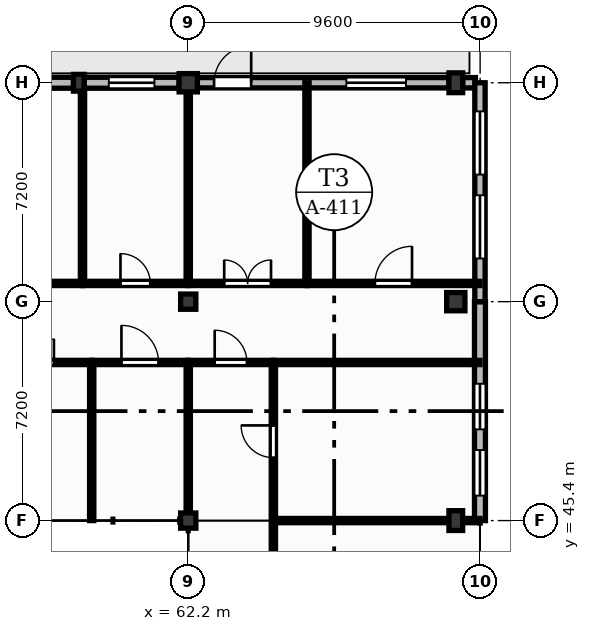
"""IFC4 building model, lengths in metres.
Left out: names, types, materials, properties, quantities, classifications, styles, units other than length and angle.
Written with IfcOpenShell. Run it as: python <this file> out.ifc"""

import sys

from ifc_helpers import new_model, si_unit, direction, frame, frame_2d, origin, origin_2d, place, context, subcontext, project, spatial, rectangle, extrude, element, fill, save


model = new_model("IFC4")
c1 = context("Model", 3, precision=1e-05, world=origin(), true_north=direction((0.0, 1.0)))
c2 = subcontext(c1, "Body", "Model", "MODEL_VIEW")
j1 = project(units=[si_unit("LENGTHUNIT", "METRE"), si_unit("PLANEANGLEUNIT", "RADIAN")], contexts=[c1])
p1 = place(None, origin())
s1 = spatial("IfcSite", under=j1, at=p1, CompositionType="ELEMENT")
p2 = place(p1, origin())
s2 = spatial("IfcBuilding", under=s1, at=p2, CompositionType="ELEMENT")
p3 = place(p2, origin())
s3 = spatial("IfcBuildingStorey", under=s2, at=p3, CompositionType="ELEMENT", Elevation=0.0)
for number, where, z_axis, x_axis in (
    (1, (62.2, 45.4, 0.0), (0.0, 0.0, 1.0), (1.0, 0.0, 0.0)),
    (2, (62.2, 52.6, 0.0), (0.0, 0.0, 1.0), (1.0, 0.0, 0.0)),
):
    element("IfcColumn", number, at=place(p3, frame(where, z_axis=z_axis, x_axis=x_axis)), inside=s3, PredefinedType="COLUMN", context=c2, shape_type="SweptSolid", body=[
        extrude(rectangle(XDim=0.5, YDim=0.5, at=origin_2d()), origin(), (0.0, 0.0, 1.0), 4.2),
    ])
p4 = place(p3, frame((62.2, 59.8, 0.0), z_axis=(0.0, 0.0, 1.0), x_axis=(1.0, 0.0, 0.0)))
e3 = element("IfcColumn", 3, at=p4, inside=s3, PredefinedType="COLUMN", context=c2, shape_type="SweptSolid", body=[
    extrude(rectangle(XDim=0.6, YDim=0.6, at=origin_2d()), origin(), (0.0, 0.0, 1.0), 4.2),
])
p5 = place(p3, frame((71.0, 45.4, 0.0), z_axis=(0.0, 0.0, 1.0), x_axis=(1.0, 0.0, 0.0)))
e4 = element("IfcColumn", 4, at=p5, inside=s3, PredefinedType="COLUMN", context=c2, shape_type="SweptSolid", body=[
    extrude(rectangle(XDim=0.45, YDim=0.65, at=origin_2d()), origin(), (0.0, 0.0, 1.0), 4.2),
])
p6 = place(p3, frame((71.0, 52.6, 0.0), z_axis=(0.0, 0.0, 1.0), x_axis=(1.0, 0.0, 0.0)))
e5 = element("IfcColumn", 5, at=p6, inside=s3, PredefinedType="COLUMN", context=c2, shape_type="SweptSolid", body=[
    extrude(rectangle(XDim=0.6, YDim=0.6, at=origin_2d()), origin(), (0.0, 0.0, 1.0), 4.2),
])
p7 = place(p3, frame((71.0, 59.8, 0.0), z_axis=(0.0, 0.0, 1.0), x_axis=(1.0, 0.0, 0.0)))
e6 = element("IfcColumn", 6, at=p7, inside=s3, PredefinedType="COLUMN", context=c2, shape_type="SweptSolid", body=[
    extrude(rectangle(XDim=0.45, YDim=0.65, at=origin_2d()), origin(), (0.0, 0.0, 1.0), 4.2),
])
p8 = place(p3, frame((58.6, 59.8, 0.0), z_axis=(0.0, 0.0, 1.0), x_axis=(1.0, 0.0, 0.0)))
e7 = element("IfcColumn", 7, at=p8, inside=s3, PredefinedType="PILASTER", context=c2, shape_type="SweptSolid", body=[
    extrude(rectangle(XDim=0.35, YDim=0.55, at=origin_2d()), origin(), (0.0, 0.0, 1.0), 4.2),
])
p9 = place(p3, frame((55.225, 59.8, 0.0), z_axis=(0.0, 0.0, 1.0), x_axis=(1.0, 0.0, 0.0)))
e8 = element("IfcWall", 8, at=p9, inside=s3, PredefinedType="SOLIDWALL", context=c2, shape_type="SweptSolid", body=[
    extrude(rectangle(XDim=3.2, YDim=0.36, at=frame_2d((1.6, 0.0))), origin(), (0.0, 0.0, 1.0), 3.68),
])
p10 = place(p9, frame((1.025, 0.0, 1.5)))
e9 = element("IfcOpeningElement", 9, at=p10, cuts=e8, PredefinedType="OPENING", context=c2, shape_type="SweptSolid", body=[
    extrude(rectangle(XDim=1.15, YDim=1.25, at=frame_2d((0.575, 0.625))), frame((0.0, 0.19, 0.0), z_axis=(0.0, -1.0, 0.0), x_axis=(1.0, 0.0, 0.0)), (0.0, 0.0, 1.0), 0.38),
])
p11 = place(p3, frame((58.775, 59.8, 0.0), z_axis=(0.0, 0.0, 1.0), x_axis=(1.0, 0.0, 0.0)))
e10 = element("IfcWall", 10, at=p11, inside=s3, PredefinedType="SOLIDWALL", context=c2, shape_type="SweptSolid", body=[
    extrude(rectangle(XDim=3.125, YDim=0.36, at=frame_2d((1.562, 0.0))), origin(), (0.0, 0.0, 1.0), 3.68),
])
p12 = place(p11, frame((0.812, 0.0, 1.5)))
e11 = element("IfcOpeningElement", 11, at=p12, cuts=e10, PredefinedType="OPENING", context=c2, shape_type="SweptSolid", body=[
    extrude(rectangle(XDim=1.5, YDim=1.25, at=frame_2d((0.75, 0.625))), frame((0.0, 0.19, 0.0), z_axis=(0.0, -1.0, 0.0), x_axis=(1.0, 0.0, 0.0)), (0.0, 0.0, 1.0), 0.38),
])
p13 = place(p3, frame((71.795, 45.4, 0.0), z_axis=(0.0, 0.0, 1.0), x_axis=(0.0, 1.0, 0.0)))
e12 = element("IfcWall", 12, at=p13, inside=s3, PredefinedType="SOLIDWALL", context=c2, shape_type="SweptSolid", body=[
    extrude(rectangle(XDim=7.2, YDim=0.36, at=frame_2d((3.6, 0.0))), origin(), (0.0, 0.0, 1.0), 4.2),
])
p14 = place(p13, frame((0.82, 0.0, 1.5)))
e13 = element("IfcOpeningElement", 13, at=p14, cuts=e12, PredefinedType="OPENING", context=c2, shape_type="SweptSolid", body=[
    extrude(rectangle(XDim=1.5, YDim=1.25, at=frame_2d((0.75, 0.625))), frame((0.0, 0.19, 0.0), z_axis=(0.0, -1.0, 0.0), x_axis=(1.0, 0.0, 0.0)), (0.0, 0.0, 1.0), 0.38),
])
p15 = place(p13, frame((3.0, 0.0, 1.5)))
e14 = element("IfcOpeningElement", 14, at=p15, cuts=e12, PredefinedType="OPENING", context=c2, shape_type="SweptSolid", body=[
    extrude(rectangle(XDim=1.5, YDim=1.25, at=frame_2d((0.75, 0.625))), frame((0.0, 0.19, 0.0), z_axis=(0.0, -1.0, 0.0), x_axis=(1.0, 0.0, 0.0)), (0.0, 0.0, 1.0), 0.38),
])
p16 = place(p3, frame((62.5, 59.8, 0.0), z_axis=(0.0, 0.0, 1.0), x_axis=(1.0, 0.0, 0.0)))
e15 = element("IfcWall", 15, at=p16, inside=s3, PredefinedType="SOLIDWALL", context=c2, shape_type="SweptSolid", body=[
    extrude(rectangle(XDim=8.275, YDim=0.34, at=frame_2d((4.137, 0.0))), origin(), (0.0, 0.0, 1.0), 3.68),
])
p17 = place(p16, frame((0.55, 0.0, 0.0)))
e16 = element("IfcOpeningElement", 16, at=p17, cuts=e15, PredefinedType="OPENING", context=c2, shape_type="SweptSolid", body=[
    extrude(rectangle(XDim=1.22, YDim=2.2, at=frame_2d((0.61, 1.1))), frame((0.0, 0.18, 0.0), z_axis=(0.0, -1.0, 0.0), x_axis=(1.0, 0.0, 0.0)), (0.0, 0.0, 1.0), 0.36),
])
p18 = place(p16, frame((4.9, 0.0, 1.05)))
e17 = element("IfcOpeningElement", 17, at=p18, cuts=e15, PredefinedType="OPENING", context=c2, shape_type="SweptSolid", body=[
    extrude(rectangle(XDim=1.96, YDim=1.65, at=frame_2d((0.98, 0.825))), frame((0.0, 0.18, 0.0), z_axis=(0.0, -1.0, 0.0), x_axis=(1.0, 0.0, 0.0)), (0.0, 0.0, 1.0), 0.36),
])
p19 = place(p3, frame((71.225, 59.8, 0.0), z_axis=(0.0, 0.0, 1.0), x_axis=(1.0, 0.0, 0.0)))
e18 = element("IfcWall", 18, at=p19, inside=s3, PredefinedType="SOLIDWALL", context=c2, shape_type="SweptSolid", body=[
    extrude(rectangle(XDim=0.42, YDim=0.34, at=frame_2d((0.21, 0.0))), origin(), (0.0, 0.0, 1.0), 4.2),
])
p20 = place(p3, frame((71.795, 52.6, 0.0), z_axis=(0.0, 0.0, 1.0), x_axis=(0.0, 1.0, 0.0)))
e19 = element("IfcWall", 19, at=p20, inside=s3, PredefinedType="SOLIDWALL", context=c2, shape_type="SweptSolid", body=[
    extrude(rectangle(XDim=7.2, YDim=0.34, at=frame_2d((3.6, 0.0))), origin(), (0.0, 0.0, 1.0), 4.2),
])
p21 = place(p20, frame((1.42, 0.0, 1.0)))
e20 = element("IfcOpeningElement", 20, at=p21, cuts=e19, PredefinedType="OPENING", context=c2, shape_type="SweptSolid", body=[
    extrude(rectangle(XDim=2.08, YDim=1.8, at=frame_2d((1.04, 0.9))), frame((0.0, 0.18, 0.0), z_axis=(0.0, -1.0, 0.0), x_axis=(1.0, 0.0, 0.0)), (0.0, 0.0, 1.0), 0.36),
])
p22 = place(p20, frame((4.18, 0.0, 1.0)))
e21 = element("IfcOpeningElement", 21, at=p22, cuts=e19, PredefinedType="OPENING", context=c2, shape_type="SweptSolid", body=[
    extrude(rectangle(XDim=2.08, YDim=1.8, at=frame_2d((1.04, 0.9))), frame((0.0, 0.18, 0.0), z_axis=(0.0, -1.0, 0.0), x_axis=(1.0, 0.0, 0.0)), (0.0, 0.0, 1.0), 0.36),
])
p23 = place(p3, frame((55.0, 50.6, 0.0), z_axis=(0.0, 0.0, 1.0), x_axis=(1.0, 0.0, 0.0)))
e22 = element("IfcWall", 22, at=p23, inside=s3, PredefinedType="PARTITIONING", context=c2, shape_type="SweptSolid", body=[
    extrude(rectangle(XDim=4.025, YDim=0.14, at=frame_2d((2.012, 0.0))), origin(), (0.0, 0.0, 1.0), 4.18),
])
p24 = place(p23, frame((1.242, 0.0, 0.0)))
e23 = element("IfcOpeningElement", 23, at=p24, cuts=e22, PredefinedType="OPENING", context=c2, shape_type="SweptSolid", body=[
    extrude(rectangle(XDim=1.54, YDim=2.25, at=frame_2d((0.77, 1.125))), frame((0.0, 0.08, 0.0), z_axis=(0.0, -1.0, 0.0), x_axis=(1.0, 0.0, 0.0)), (0.0, 0.0, 1.0), 0.16),
])
p25 = place(p3, frame((55.0, 53.2, 0.0), z_axis=(0.0, 0.0, 1.0), x_axis=(1.0, 0.0, 0.0)))
e24 = element("IfcWall", 24, at=p25, inside=s3, PredefinedType="PARTITIONING", context=c2, shape_type="SweptSolid", body=[
    extrude(rectangle(XDim=3.722, YDim=0.14, at=frame_2d((1.861, 0.0))), origin(), (0.0, 0.0, 1.0), 4.18),
])
p26 = place(p25, frame((1.386, 0.0, 0.0)))
e25 = element("IfcOpeningElement", 25, at=p26, cuts=e24, PredefinedType="OPENING", context=c2, shape_type="SweptSolid", body=[
    extrude(rectangle(XDim=0.95, YDim=2.1, at=frame_2d((0.475, 1.05))), frame((0.0, 0.08, 0.0), z_axis=(0.0, -1.0, 0.0), x_axis=(1.0, 0.0, 0.0)), (0.0, 0.0, 1.0), 0.16),
])
p27 = place(p3, frame((58.722, 53.27, 0.0), z_axis=(0.0, 0.0, 1.0), x_axis=(0.0, 1.0, 0.0)))
e26 = element("IfcWall", 26, at=p27, inside=s3, PredefinedType="PARTITIONING", context=c2, shape_type="SweptSolid", body=[
    extrude(rectangle(XDim=6.255, YDim=0.14, at=frame_2d((3.127, 0.0))), origin(), (0.0, 0.0, 1.0), 4.18),
])
p28 = place(p3, frame((58.722, 53.2, 0.0), z_axis=(0.0, 0.0, 1.0), x_axis=(1.0, 0.0, 0.0)))
e27 = element("IfcWall", 27, at=p28, inside=s3, PredefinedType="PARTITIONING", context=c2, shape_type="SweptSolid", body=[
    extrude(rectangle(XDim=3.478, YDim=0.14, at=frame_2d((1.739, 0.0))), origin(), (0.0, 0.0, 1.0), 4.18),
])
p29 = place(p28, frame((1.249, 0.0, 0.0)))
e28 = element("IfcOpeningElement", 28, at=p29, cuts=e27, PredefinedType="OPENING", context=c2, shape_type="SweptSolid", body=[
    extrude(rectangle(XDim=0.98, YDim=2.15, at=frame_2d((0.49, 1.075))), frame((0.0, 0.08, 0.0), z_axis=(0.0, -1.0, 0.0), x_axis=(1.0, 0.0, 0.0)), (0.0, 0.0, 1.0), 0.16),
])
p30 = place(p3, frame((59.025, 45.4, 0.0), z_axis=(0.0, 0.0, 1.0), x_axis=(0.0, 1.0, 0.0)))
e29 = element("IfcWall", 29, at=p30, inside=s3, PredefinedType="PARTITIONING", context=c2, shape_type="SweptSolid", body=[
    extrude(rectangle(XDim=5.13, YDim=0.14, at=frame_2d((2.565, 0.0))), origin(), (0.0, 0.0, 1.0), 4.18),
])
p31 = place(p3, frame((59.025, 50.6, 0.0), z_axis=(0.0, 0.0, 1.0), x_axis=(1.0, 0.0, 0.0)))
e30 = element("IfcWall", 30, at=p31, inside=s3, PredefinedType="PARTITIONING", context=c2, shape_type="SweptSolid", body=[
    extrude(rectangle(XDim=3.175, YDim=0.14, at=frame_2d((1.587, 0.0))), origin(), (0.0, 0.0, 1.0), 4.18),
])
p32 = place(p31, frame((0.978, 0.0, 0.0)))
e31 = element("IfcOpeningElement", 31, at=p32, cuts=e30, PredefinedType="OPENING", context=c2, shape_type="SweptSolid", body=[
    extrude(rectangle(XDim=1.22, YDim=2.1, at=frame_2d((0.61, 1.05))), frame((0.0, 0.08, 0.0), z_axis=(0.0, -1.0, 0.0), x_axis=(1.0, 0.0, 0.0)), (0.0, 0.0, 1.0), 0.16),
])
p33 = place(p3, frame((62.2, 45.65, 0.0), z_axis=(0.0, 0.0, 1.0), x_axis=(0.0, 1.0, 0.0)))
e32 = element("IfcWall", 32, at=p33, inside=s3, PredefinedType="PARTITIONING", context=c2, shape_type="SweptSolid", body=[
    extrude(rectangle(XDim=4.88, YDim=0.14, at=frame_2d((2.44, 0.0))), origin(), (0.0, 0.0, 1.0), 3.5),
])
p34 = place(p3, frame((62.2, 50.6, 0.0), z_axis=(0.0, 0.0, 1.0), x_axis=(1.0, 0.0, 0.0)))
e33 = element("IfcWall", 33, at=p34, inside=s3, PredefinedType="PARTITIONING", context=c2, shape_type="SweptSolid", body=[
    extrude(rectangle(XDim=2.8, YDim=0.14, at=frame_2d((1.4, 0.0))), origin(), (0.0, 0.0, 1.0), 4.18),
])
p35 = place(p34, frame((0.87, 0.0, 0.0)))
e34 = element("IfcOpeningElement", 34, at=p35, cuts=e33, PredefinedType="OPENING", context=c2, shape_type="SweptSolid", body=[
    extrude(rectangle(XDim=1.06, YDim=2.15, at=frame_2d((0.53, 1.075))), frame((0.0, 0.08, 0.0), z_axis=(0.0, -1.0, 0.0), x_axis=(1.0, 0.0, 0.0)), (0.0, 0.0, 1.0), 0.16),
])
p36 = place(p3, frame((62.2, 53.27, 0.0), z_axis=(0.0, 0.0, 1.0), x_axis=(0.0, 1.0, 0.0)))
e35 = element("IfcWall", 35, at=p36, inside=s3, PredefinedType="PARTITIONING", context=c2, shape_type="SweptSolid", body=[
    extrude(rectangle(XDim=6.23, YDim=0.14, at=frame_2d((3.115, 0.0))), origin(), (0.0, 0.0, 1.0), 3.5),
])
p37 = place(p3, frame((62.2, 53.2, 0.0), z_axis=(0.0, 0.0, 1.0), x_axis=(1.0, 0.0, 0.0)))
e36 = element("IfcWall", 36, at=p37, inside=s3, PredefinedType="PARTITIONING", context=c2, shape_type="SweptSolid", body=[
    extrude(rectangle(XDim=3.905, YDim=0.14, at=frame_2d((1.953, 0.0))), origin(), (0.0, 0.0, 1.0), 4.18),
])
p38 = place(p37, frame((1.183, 0.0, 0.0)))
e37 = element("IfcOpeningElement", 37, at=p38, cuts=e36, PredefinedType="OPENING", context=c2, shape_type="SweptSolid", body=[
    extrude(rectangle(XDim=1.54, YDim=2.25, at=frame_2d((0.77, 1.125))), frame((0.0, 0.08, 0.0), z_axis=(0.0, -1.0, 0.0), x_axis=(1.0, 0.0, 0.0)), (0.0, 0.0, 1.0), 0.16),
])
p39 = place(p3, frame((65.0, 36.87, 0.0), z_axis=(0.0, 0.0, 1.0), x_axis=(0.0, 1.0, 0.0)))
e38 = element("IfcWall", 38, at=p39, inside=s3, PredefinedType="PARTITIONING", context=c2, shape_type="SweptSolid", body=[
    extrude(rectangle(XDim=8.46, YDim=0.14, at=frame_2d((4.23, 0.0))), origin(), (0.0, 0.0, 1.0), 4.18),
])
p40 = place(p39, frame((3.755, 0.0, 0.0)))
e39 = element("IfcOpeningElement", 39, at=p40, cuts=e38, PredefinedType="OPENING", context=c2, shape_type="SweptSolid", body=[
    extrude(rectangle(XDim=0.95, YDim=2.1, at=frame_2d((0.475, 1.05))), frame((0.0, 0.08, 0.0), z_axis=(0.0, -1.0, 0.0), x_axis=(1.0, 0.0, 0.0)), (0.0, 0.0, 1.0), 0.16),
])
p41 = place(p3, frame((65.0, 45.47, 0.0), z_axis=(0.0, 0.0, 1.0), x_axis=(0.0, 1.0, 0.0)))
e40 = element("IfcWall", 40, at=p41, inside=s3, PredefinedType="PARTITIONING", context=c2, shape_type="SweptSolid", body=[
    extrude(rectangle(XDim=5.06, YDim=0.14, at=frame_2d((2.53, 0.0))), origin(), (0.0, 0.0, 1.0), 4.18),
])
p42 = place(p41, frame((2.0, 0.0, 0.0)))
e41 = element("IfcOpeningElement", 41, at=p42, cuts=e40, PredefinedType="OPENING", context=c2, shape_type="SweptSolid", body=[
    extrude(rectangle(XDim=1.06, YDim=2.15, at=frame_2d((0.53, 1.075))), frame((0.0, 0.08, 0.0), z_axis=(0.0, -1.0, 0.0), x_axis=(1.0, 0.0, 0.0)), (0.0, 0.0, 1.0), 0.16),
])
p43 = place(p3, frame((65.0, 45.4, 0.0), z_axis=(0.0, 0.0, 1.0), x_axis=(1.0, 0.0, 0.0)))
e42 = element("IfcWall", 42, at=p43, inside=s3, PredefinedType="PARTITIONING", context=c2, shape_type="SweptSolid", body=[
    extrude(rectangle(XDim=5.775, YDim=0.14, at=frame_2d((2.887, 0.0))), origin(), (0.0, 0.0, 1.0), 3.05),
])
p44 = place(p3, frame((71.225, 45.4, 0.0), z_axis=(0.0, 0.0, 1.0), x_axis=(1.0, 0.0, 0.0)))
e43 = element("IfcWall", 43, at=p44, inside=s3, PredefinedType="PARTITIONING", context=c2, shape_type="SweptSolid", body=[
    extrude(rectangle(XDim=0.57, YDim=0.14, at=frame_2d((0.285, 0.0))), origin(), (0.0, 0.0, 1.0), 4.18),
])
p45 = place(p3, frame((65.0, 50.6, 0.0), z_axis=(0.0, 0.0, 1.0), x_axis=(1.0, 0.0, 0.0)))
e44 = element("IfcWall", 44, at=p45, inside=s3, PredefinedType="PARTITIONING", context=c2, shape_type="SweptSolid", body=[
    extrude(rectangle(XDim=6.795, YDim=0.14, at=frame_2d((3.397, 0.0))), origin(), (0.0, 0.0, 1.0), 4.18),
])
p46 = place(p3, frame((66.105, 53.27, 0.0), z_axis=(0.0, 0.0, 1.0), x_axis=(0.0, 1.0, 0.0)))
e45 = element("IfcWall", 45, at=p46, inside=s3, PredefinedType="PARTITIONING", context=c2, shape_type="SweptSolid", body=[
    extrude(rectangle(XDim=6.53, YDim=0.14, at=frame_2d((3.265, 0.0))), origin(), (0.0, 0.0, 1.0), 4.18),
])
p47 = place(p3, frame((66.105, 53.2, 0.0), z_axis=(0.0, 0.0, 1.0), x_axis=(1.0, 0.0, 0.0)))
e46 = element("IfcWall", 46, at=p47, inside=s3, PredefinedType="PARTITIONING", context=c2, shape_type="SweptSolid", body=[
    extrude(rectangle(XDim=5.69, YDim=0.14, at=frame_2d((2.845, 0.0))), origin(), (0.0, 0.0, 1.0), 4.18),
])
p48 = place(p47, frame((2.235, 0.0, 0.0)))
e47 = element("IfcOpeningElement", 47, at=p48, cuts=e46, PredefinedType="OPENING", context=c2, shape_type="SweptSolid", body=[
    extrude(rectangle(XDim=1.22, YDim=2.1, at=frame_2d((0.61, 1.05))), frame((0.0, 0.08, 0.0), z_axis=(0.0, -1.0, 0.0), x_axis=(1.0, 0.0, 0.0)), (0.0, 0.0, 1.0), 0.16),
])
p49 = place(p12, origin())
e48 = element("IfcWindow", 48, at=p49, inside=s3, PartitioningType="DOUBLE_PANEL_VERTICAL", PredefinedType="WINDOW", context=c2, shape_type="SweptSolid", body=[
    extrude(rectangle(XDim=1.5, YDim=1.25, at=frame_2d((0.75, 0.625))), frame((0.0, 0.03, 0.0), z_axis=(0.0, -1.0, 0.0), x_axis=(1.0, 0.0, 0.0)), (0.0, 0.0, 1.0), 0.06),
])
fill(e11, e48)
p50 = place(p14, origin())
e49 = element("IfcWindow", 49, at=p50, inside=s3, PartitioningType="DOUBLE_PANEL_VERTICAL", PredefinedType="WINDOW", context=c2, shape_type="SweptSolid", body=[
    extrude(rectangle(XDim=1.5, YDim=1.25, at=frame_2d((0.75, 0.625))), frame((0.0, 0.03, 0.0), z_axis=(0.0, -1.0, 0.0), x_axis=(1.0, 0.0, 0.0)), (0.0, 0.0, 1.0), 0.06),
])
fill(e13, e49)
p51 = place(p15, origin())
e50 = element("IfcWindow", 50, at=p51, inside=s3, PartitioningType="DOUBLE_PANEL_VERTICAL", PredefinedType="WINDOW", context=c2, shape_type="SweptSolid", body=[
    extrude(rectangle(XDim=1.5, YDim=1.25, at=frame_2d((0.75, 0.625))), frame((0.0, 0.03, 0.0), z_axis=(0.0, -1.0, 0.0), x_axis=(1.0, 0.0, 0.0)), (0.0, 0.0, 1.0), 0.06),
])
fill(e14, e50)
p52 = place(p17, origin())
e51 = element("IfcDoor", 51, at=p52, inside=s3, OperationType="SINGLE_SWING_RIGHT", PredefinedType="DOOR", context=c2, shape_type="SweptSolid", body=[
    extrude(rectangle(XDim=1.22, YDim=2.2, at=frame_2d((0.61, 1.1))), frame((0.0, 0.025, 0.0), z_axis=(0.0, -1.0, 0.0), x_axis=(1.0, 0.0, 0.0)), (0.0, 0.0, 1.0), 0.05),
])
fill(e16, e51)
p53 = place(p18, origin())
e52 = element("IfcWindow", 52, at=p53, inside=s3, PartitioningType="DOUBLE_PANEL_VERTICAL", PredefinedType="WINDOW", context=c2, shape_type="SweptSolid", body=[
    extrude(rectangle(XDim=1.96, YDim=1.65, at=frame_2d((0.98, 0.825))), frame((0.0, 0.03, 0.0), z_axis=(0.0, -1.0, 0.0), x_axis=(1.0, 0.0, 0.0)), (0.0, 0.0, 1.0), 0.06),
])
fill(e17, e52)
p54 = place(p21, origin())
e53 = element("IfcWindow", 53, at=p54, inside=s3, PartitioningType="DOUBLE_PANEL_VERTICAL", PredefinedType="WINDOW", context=c2, shape_type="SweptSolid", body=[
    extrude(rectangle(XDim=2.08, YDim=1.8, at=frame_2d((1.04, 0.9))), frame((0.0, 0.03, 0.0), z_axis=(0.0, -1.0, 0.0), x_axis=(1.0, 0.0, 0.0)), (0.0, 0.0, 1.0), 0.06),
])
fill(e20, e53)
p55 = place(p22, origin())
e54 = element("IfcWindow", 54, at=p55, inside=s3, PartitioningType="DOUBLE_PANEL_VERTICAL", PredefinedType="WINDOW", context=c2, shape_type="SweptSolid", body=[
    extrude(rectangle(XDim=2.08, YDim=1.8, at=frame_2d((1.04, 0.9))), frame((0.0, 0.03, 0.0), z_axis=(0.0, -1.0, 0.0), x_axis=(1.0, 0.0, 0.0)), (0.0, 0.0, 1.0), 0.06),
])
fill(e21, e54)
p56 = place(p35, origin())
e55 = element("IfcDoor", 55, at=p56, inside=s3, OperationType="SINGLE_SWING_LEFT", PredefinedType="DOOR", context=c2, shape_type="SweptSolid", body=[
    extrude(rectangle(XDim=1.06, YDim=2.15, at=frame_2d((0.53, 1.075))), frame((0.0, 0.025, 0.0), z_axis=(0.0, -1.0, 0.0), x_axis=(1.0, 0.0, 0.0)), (0.0, 0.0, 1.0), 0.05),
])
fill(e34, e55)
p57 = place(p24, origin())
e56 = element("IfcDoor", 56, at=p57, inside=s3, OperationType="DOUBLE_DOOR_SINGLE_SWING", PredefinedType="DOOR", context=c2, shape_type="SweptSolid", body=[
    extrude(rectangle(XDim=1.54, YDim=2.25, at=frame_2d((0.77, 1.125))), frame((0.0, 0.025, 0.0), z_axis=(0.0, -1.0, 0.0), x_axis=(1.0, 0.0, 0.0)), (0.0, 0.0, 1.0), 0.05),
])
fill(e23, e56)
p58 = place(p32, origin())
e57 = element("IfcDoor", 57, at=p58, inside=s3, OperationType="SINGLE_SWING_LEFT", PredefinedType="DOOR", context=c2, shape_type="SweptSolid", body=[
    extrude(rectangle(XDim=1.22, YDim=2.1, at=frame_2d((0.61, 1.05))), frame((0.0, 0.025, 0.0), z_axis=(0.0, -1.0, 0.0), x_axis=(1.0, 0.0, 0.0)), (0.0, 0.0, 1.0), 0.05),
])
fill(e31, e57)
p59 = place(p29, origin())
e58 = element("IfcDoor", 58, at=p59, inside=s3, OperationType="SINGLE_SWING_LEFT", PredefinedType="DOOR", context=c2, shape_type="SweptSolid", body=[
    extrude(rectangle(XDim=0.98, YDim=2.15, at=frame_2d((0.49, 1.075))), frame((0.0, 0.025, 0.0), z_axis=(0.0, -1.0, 0.0), x_axis=(1.0, 0.0, 0.0)), (0.0, 0.0, 1.0), 0.05),
])
fill(e28, e58)
p60 = place(p42, origin())
e59 = element("IfcDoor", 59, at=p60, inside=s3, OperationType="SINGLE_SWING_RIGHT", PredefinedType="DOOR", context=c2, shape_type="SweptSolid", body=[
    extrude(rectangle(XDim=1.06, YDim=2.15, at=frame_2d((0.53, 1.075))), frame((0.0, 0.025, 0.0), z_axis=(0.0, -1.0, 0.0), x_axis=(1.0, 0.0, 0.0)), (0.0, 0.0, 1.0), 0.05),
])
fill(e41, e59)
p61 = place(p38, origin())
e60 = element("IfcDoor", 60, at=p61, inside=s3, OperationType="DOUBLE_DOOR_SINGLE_SWING", PredefinedType="DOOR", context=c2, shape_type="SweptSolid", body=[
    extrude(rectangle(XDim=1.54, YDim=2.25, at=frame_2d((0.77, 1.125))), frame((0.0, 0.025, 0.0), z_axis=(0.0, -1.0, 0.0), x_axis=(1.0, 0.0, 0.0)), (0.0, 0.0, 1.0), 0.05),
])
fill(e37, e60)
p62 = place(p48, origin())
e61 = element("IfcDoor", 61, at=p62, inside=s3, OperationType="SINGLE_SWING_RIGHT", PredefinedType="DOOR", context=c2, shape_type="SweptSolid", body=[
    extrude(rectangle(XDim=1.22, YDim=2.1, at=frame_2d((0.61, 1.05))), frame((0.0, 0.025, 0.0), z_axis=(0.0, -1.0, 0.0), x_axis=(1.0, 0.0, 0.0)), (0.0, 0.0, 1.0), 0.05),
])
fill(e47, e61)
save(model, sys.argv[1])
